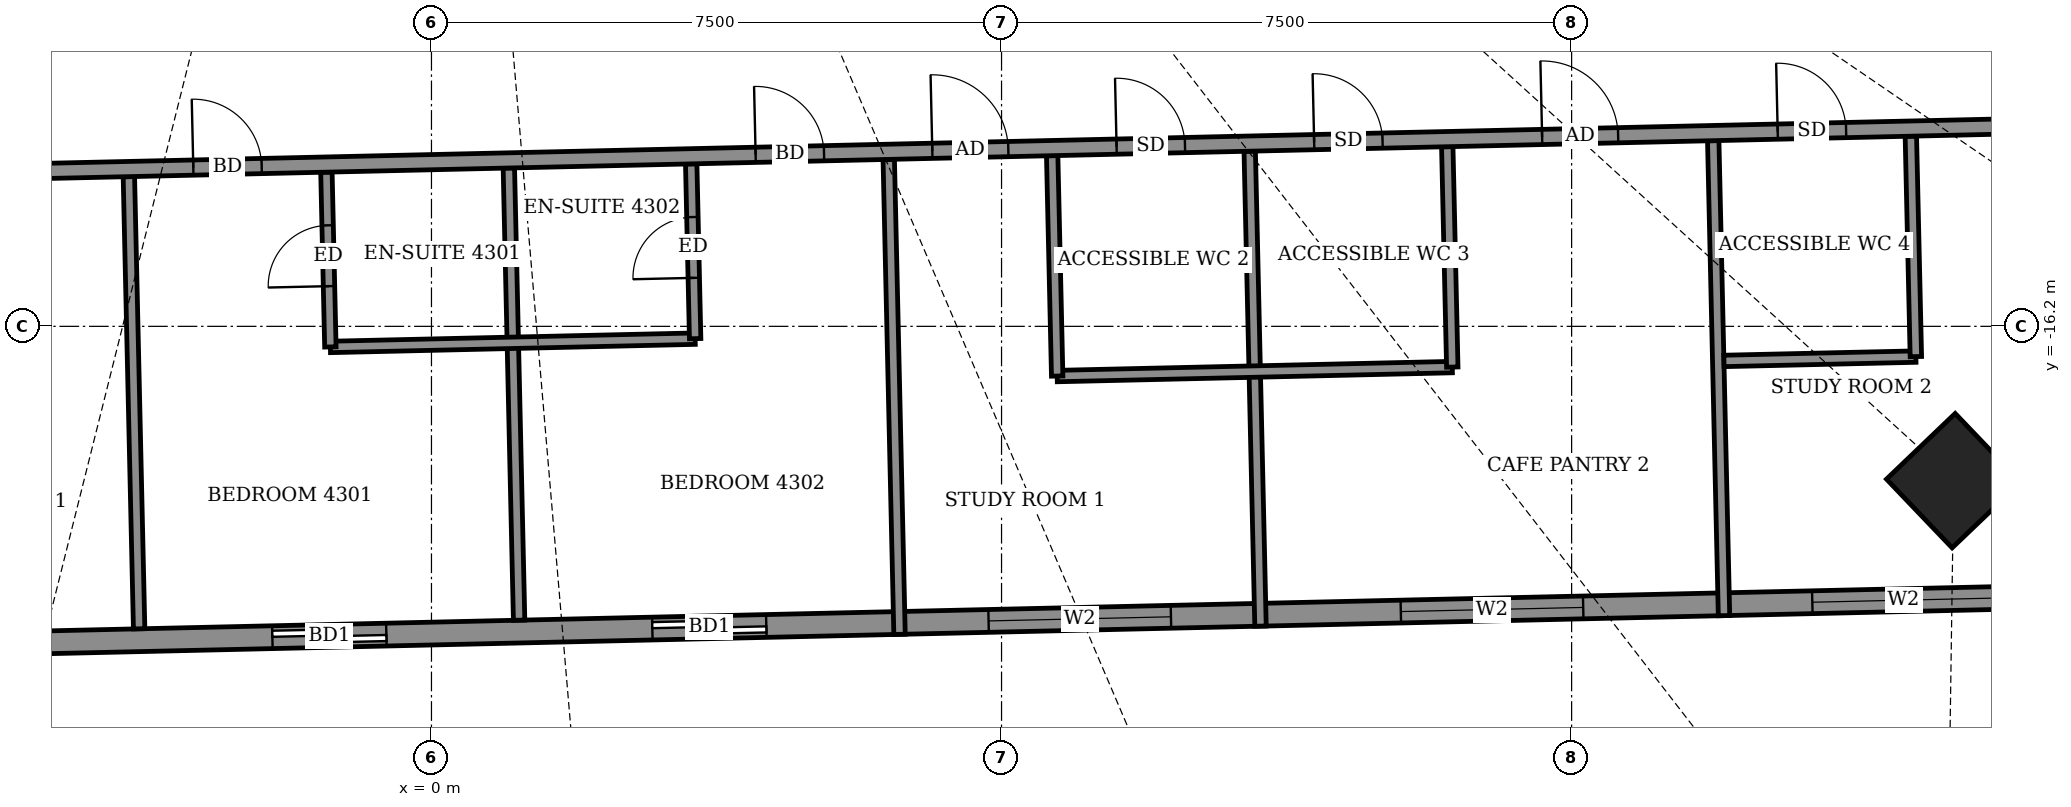
"""IFC4 building model, lengths in metres.
Left out: names, types, materials, properties, quantities, classifications, styles, units other than length and angle.
Written with IfcOpenShell. Run it as: python <this file> out.ifc"""

import sys

from ifc_helpers import new_model, si_unit, direction, frame, frame_2d, origin, origin_2d, place, context, subcontext, project, spatial, rectangle, extrude, element, fill, save


model = new_model("IFC4")
c1 = context("Model", 3, precision=1e-05, world=origin(), true_north=direction((0.0, 1.0)))
c2 = subcontext(c1, "Body", "Model", "MODEL_VIEW")
j1 = project(units=[si_unit("LENGTHUNIT", "METRE"), si_unit("PLANEANGLEUNIT", "RADIAN")], contexts=[c1])
p1 = place(None, origin())
s1 = spatial("IfcSite", under=j1, at=p1, CompositionType="ELEMENT")
p2 = place(p1, origin())
s2 = spatial("IfcBuilding", under=s1, at=p2, CompositionType="ELEMENT")
p3 = place(p2, frame((0.0, 0.0, 170.7)))
s3 = spatial("IfcBuildingStorey", under=s2, at=p3, CompositionType="ELEMENT", Elevation=170.7)
p4 = place(p3, frame((20.026, -18.23, -0.55), z_axis=(0.0, 0.0, 1.0), x_axis=(0.722965976266, 0.690883635037, 0.0)))
e1 = element("IfcColumn", 1, at=p4, inside=s3, PredefinedType="COLUMN", context=c2, shape_type="SweptSolid", body=[
    extrude(rectangle(XDim=1.25, YDim=1.25, at=origin_2d()), origin(), (0.0, 0.0, 1.0), 4.6),
])
p5 = place(p3, frame((-18.189, -20.655, 0.0), z_axis=(0.0, 0.0, 1.0), x_axis=(0.999742285265, 0.022701609063, 0.0)))
e2 = element("IfcWall", 2, at=p5, inside=s3, PredefinedType="SOLIDWALL", context=c2, shape_type="SweptSolid", body=[
    extrude(rectangle(XDim=39.78, YDim=0.3, at=frame_2d((19.89, 0.0))), origin(), (0.0, 0.0, 1.0), 2.55),
])
p6 = place(p5, frame((3.325, 0.0, 0.0)))
e3 = element("IfcOpeningElement", 3, at=p6, cuts=e2, PredefinedType="OPENING", context=c2, shape_type="SweptSolid", body=[
    extrude(rectangle(XDim=1.5, YDim=2.4, at=frame_2d((0.75, 1.2))), frame((0.0, 0.16, 0.0), z_axis=(0.0, -1.0, 0.0), x_axis=(1.0, 0.0, 0.0)), (0.0, 0.0, 1.0), 0.32),
])
p7 = place(p5, frame((10.125, 0.0, 0.9)))
e4 = element("IfcOpeningElement", 4, at=p7, cuts=e2, PredefinedType="OPENING", context=c2, shape_type="SweptSolid", body=[
    extrude(rectangle(XDim=2.4, YDim=1.5, at=frame_2d((1.2, 0.75))), frame((0.0, 0.16, 0.0), z_axis=(0.0, -1.0, 0.0), x_axis=(1.0, 0.0, 0.0)), (0.0, 0.0, 1.0), 0.32),
])
p8 = place(p5, frame((16.1, 0.0, 0.0)))
e5 = element("IfcOpeningElement", 5, at=p8, cuts=e2, PredefinedType="OPENING", context=c2, shape_type="SweptSolid", body=[
    extrude(rectangle(XDim=1.5, YDim=2.4, at=frame_2d((0.75, 1.2))), frame((0.0, 0.16, 0.0), z_axis=(0.0, -1.0, 0.0), x_axis=(1.0, 0.0, 0.0)), (0.0, 0.0, 1.0), 0.32),
])
p9 = place(p5, frame((21.1, 0.0, 0.0)))
e6 = element("IfcOpeningElement", 6, at=p9, cuts=e2, PredefinedType="OPENING", context=c2, shape_type="SweptSolid", body=[
    extrude(rectangle(XDim=1.5, YDim=2.4, at=frame_2d((0.75, 1.2))), frame((0.0, 0.16, 0.0), z_axis=(0.0, -1.0, 0.0), x_axis=(1.0, 0.0, 0.0)), (0.0, 0.0, 1.0), 0.32),
])
p10 = place(p5, frame((25.525, 0.0, 0.9)))
e7 = element("IfcOpeningElement", 7, at=p10, cuts=e2, PredefinedType="OPENING", context=c2, shape_type="SweptSolid", body=[
    extrude(rectangle(XDim=2.4, YDim=1.5, at=frame_2d((1.2, 0.75))), frame((0.0, 0.16, 0.0), z_axis=(0.0, -1.0, 0.0), x_axis=(1.0, 0.0, 0.0)), (0.0, 0.0, 1.0), 0.32),
])
p11 = place(p5, frame((30.95, 0.0, 0.9)))
e8 = element("IfcOpeningElement", 8, at=p11, cuts=e2, PredefinedType="OPENING", context=c2, shape_type="SweptSolid", body=[
    extrude(rectangle(XDim=2.4, YDim=1.5, at=frame_2d((1.2, 0.75))), frame((0.0, 0.16, 0.0), z_axis=(0.0, -1.0, 0.0), x_axis=(1.0, 0.0, 0.0)), (0.0, 0.0, 1.0), 0.32),
])
p12 = place(p5, frame((36.365, 0.0, 0.9)))
e9 = element("IfcOpeningElement", 9, at=p12, cuts=e2, PredefinedType="OPENING", context=c2, shape_type="SweptSolid", body=[
    extrude(rectangle(XDim=2.4, YDim=1.5, at=frame_2d((1.2, 0.75))), frame((0.0, 0.16, 0.0), z_axis=(0.0, -1.0, 0.0), x_axis=(1.0, 0.0, 0.0)), (0.0, 0.0, 1.0), 0.32),
])
p13 = place(p3, frame((-3.846, -20.179, 0.0), z_axis=(0.0, 0.0, 1.0), x_axis=(-0.022692509051, 0.999742491861, 0.0)))
e10 = element("IfcWall", 10, at=p13, inside=s3, PredefinedType="PARTITIONING", context=c2, shape_type="SweptSolid", body=[
    extrude(rectangle(XDim=5.949, YDim=0.15, at=frame_2d((2.975, 0.0))), origin(), (0.0, 0.0, 1.0), 2.85),
])
p14 = place(p3, frame((1.153, -20.066, 0.0), z_axis=(0.0, 0.0, 1.0), x_axis=(-0.022688785847, 0.999742576365, 0.0)))
e11 = element("IfcWall", 11, at=p14, inside=s3, PredefinedType="PARTITIONING", context=c2, shape_type="SweptSolid", body=[
    extrude(rectangle(XDim=5.95, YDim=0.15, at=frame_2d((2.975, 0.0))), origin(), (0.0, 0.0, 1.0), 2.85),
])
p15 = place(p3, frame((6.158, -20.252, 0.0), z_axis=(0.0, 0.0, 1.0), x_axis=(-0.022696558861, 0.999742399929, 0.0)))
e12 = element("IfcWall", 12, at=p15, inside=s3, PredefinedType="PARTITIONING", context=c2, shape_type="SweptSolid", body=[
    extrude(rectangle(XDim=6.25, YDim=0.15, at=frame_2d((3.125, 0.0))), origin(), (0.0, 0.0, 1.0), 2.85),
])
p16 = place(p3, frame((10.907, -20.144, 0.0), z_axis=(0.0, 0.0, 1.0), x_axis=(-0.02273560333, 0.999741512763, 0.0)))
e13 = element("IfcWall", 13, at=p16, inside=s3, PredefinedType="PARTITIONING", context=c2, shape_type="SweptSolid", body=[
    extrude(rectangle(XDim=6.25, YDim=0.15, at=frame_2d((3.125, 0.0))), origin(), (0.0, 0.0, 1.0), 2.55),
])
p17 = place(p3, frame((17.005, -20.006, 0.0), z_axis=(0.0, 0.0, 1.0), x_axis=(-0.022696558861, 0.999742399929, 0.0)))
e14 = element("IfcWall", 14, at=p17, inside=s3, PredefinedType="PARTITIONING", context=c2, shape_type="SweptSolid", body=[
    extrude(rectangle(XDim=6.25, YDim=0.15, at=frame_2d((3.125, 0.0))), origin(), (0.0, 0.0, 1.0), 2.85),
])
p18 = place(p3, frame((8.232, -16.854, 0.0), z_axis=(0.0, 0.0, 1.0), x_axis=(0.999742780105, 0.022679806622, 0.0)))
e15 = element("IfcWall", 15, at=p18, inside=s3, PredefinedType="PARTITIONING", context=c2, shape_type="SweptSolid", body=[
    extrude(rectangle(XDim=5.199, YDim=0.15, at=frame_2d((2.6, 0.0))), origin(), (0.0, 0.0, 1.0), 2.55),
])
p19 = place(p3, frame((8.232, -16.854, 0.0), z_axis=(0.0, 0.0, 1.0), x_axis=(-0.022732880677, 0.999741574676, 0.0)))
e16 = element("IfcWall", 16, at=p19, inside=s3, PredefinedType="PARTITIONING", context=c2, shape_type="SweptSolid", body=[
    extrude(rectangle(XDim=2.9, YDim=0.15, at=frame_2d((1.45, 0.0))), origin(), (0.0, 0.0, 1.0), 4.05),
])
p20 = place(p3, frame((13.43, -16.736, 0.0), z_axis=(0.0, 0.0, 1.0), x_axis=(-0.022730967319, 0.999741618182, 0.0)))
e17 = element("IfcWall", 17, at=p20, inside=s3, PredefinedType="PARTITIONING", context=c2, shape_type="SweptSolid", body=[
    extrude(rectangle(XDim=2.9, YDim=0.15, at=frame_2d((1.45, 0.0))), origin(), (0.0, 0.0, 1.0), 2.55),
])
p21 = place(p3, frame((17.004, -16.655, 0.0), z_axis=(0.0, 0.0, 1.0), x_axis=(0.999744175585, 0.022618209135, 0.0)))
e18 = element("IfcWall", 18, at=p21, inside=s3, PredefinedType="PARTITIONING", context=c2, shape_type="SweptSolid", body=[
    extrude(rectangle(XDim=2.526, YDim=0.15, at=frame_2d((1.263, 0.0))), origin(), (0.0, 0.0, 1.0), 2.85),
])
p22 = place(p3, frame((19.529, -16.598, 0.0), z_axis=(0.0, 0.0, 1.0), x_axis=(-0.022817032779, 0.999739657619, 0.0)))
e19 = element("IfcWall", 19, at=p22, inside=s3, PredefinedType="PARTITIONING", context=c2, shape_type="SweptSolid", body=[
    extrude(rectangle(XDim=2.9, YDim=0.15, at=frame_2d((1.45, 0.0))), origin(), (0.0, 0.0, 1.0), 2.75),
])
p23 = place(p3, frame((-1.33, -16.471, 0.0), z_axis=(0.0, 0.0, 1.0), x_axis=(0.999742701292, 0.022683280499, 0.0)))
e20 = element("IfcWall", 20, at=p23, inside=s3, PredefinedType="PARTITIONING", context=c2, shape_type="SweptSolid", body=[
    extrude(rectangle(XDim=4.8, YDim=0.15, at=frame_2d((2.4, 0.0))), origin(), (0.0, 0.0, 1.0), 2.85),
])
p24 = place(p3, frame((-1.33, -16.471, 0.0), z_axis=(0.0, 0.0, 1.0), x_axis=(-0.022615284993, 0.999744241736, 0.0)))
e21 = element("IfcWall", 21, at=p24, inside=s3, PredefinedType="PARTITIONING", context=c2, shape_type="SweptSolid", body=[
    extrude(rectangle(XDim=2.299, YDim=0.15, at=frame_2d((1.15, 0.0))), origin(), (0.0, 0.0, 1.0), 4.05),
])
p25 = place(p24, frame((0.8, 0.0, 0.0)))
e22 = element("IfcOpeningElement", 22, at=p25, cuts=e21, PredefinedType="OPENING", context=c2, shape_type="SweptSolid", body=[
    extrude(rectangle(XDim=0.8, YDim=2.1, at=frame_2d((0.4, 1.05))), frame((0.0, 0.085, 0.0), z_axis=(0.0, -1.0, 0.0), x_axis=(1.0, 0.0, 0.0)), (0.0, 0.0, 1.0), 0.17),
])
p26 = place(p3, frame((3.469, -16.362, 0.0), z_axis=(0.0, 0.0, 1.0), x_axis=(-0.022612884682, 0.999744296031, 0.0)))
e23 = element("IfcWall", 23, at=p26, inside=s3, PredefinedType="PARTITIONING", context=c2, shape_type="SweptSolid", body=[
    extrude(rectangle(XDim=2.3, YDim=0.15, at=frame_2d((1.15, 0.0))), origin(), (0.0, 0.0, 1.0), 4.05),
])
p27 = place(p26, frame((0.8, 0.0, 0.0)))
e24 = element("IfcOpeningElement", 24, at=p27, cuts=e23, PredefinedType="OPENING", context=c2, shape_type="SweptSolid", body=[
    extrude(rectangle(XDim=0.8, YDim=2.1, at=frame_2d((0.4, 1.05))), frame((0.0, 0.085, 0.0), z_axis=(0.0, -1.0, 0.0), x_axis=(1.0, 0.0, 0.0)), (0.0, 0.0, 1.0), 0.17),
])
p28 = place(p3, frame((-16.645, -14.418, 0.0), z_axis=(0.0, 0.0, 1.0), x_axis=(0.999742564802, 0.022689295346, 0.0)))
e25 = element("IfcWall", 25, at=p28, inside=s3, PredefinedType="PARTITIONING", context=c2, shape_type="SweptSolid", body=[
    extrude(rectangle(XDim=40.587, YDim=0.2, at=frame_2d((20.294, 0.0))), origin(), (0.0, 0.0, 1.0), 2.55),
])
p29 = place(p28, frame((4.965, 0.0, 0.0)))
e26 = element("IfcOpeningElement", 26, at=p29, cuts=e25, PredefinedType="OPENING", context=c2, shape_type="SweptSolid", body=[
    extrude(rectangle(XDim=0.9, YDim=2.1, at=frame_2d((0.45, 1.05))), frame((0.0, 0.11, 0.0), z_axis=(0.0, -1.0, 0.0), x_axis=(1.0, 0.0, 0.0)), (0.0, 0.0, 1.0), 0.22),
])
p30 = place(p28, frame((10.44, 0.0, 0.0)))
e27 = element("IfcOpeningElement", 27, at=p30, cuts=e25, PredefinedType="OPENING", context=c2, shape_type="SweptSolid", body=[
    extrude(rectangle(XDim=1.0, YDim=2.1, at=frame_2d((0.5, 1.05))), frame((0.0, 0.11, 0.0), z_axis=(0.0, -1.0, 0.0), x_axis=(1.0, 0.0, 0.0)), (0.0, 0.0, 1.0), 0.22),
])
p31 = place(p28, frame((7.465, 0.0, 0.0)))
e28 = element("IfcOpeningElement", 28, at=p31, cuts=e25, PredefinedType="OPENING", context=c2, shape_type="SweptSolid", body=[
    extrude(rectangle(XDim=0.9, YDim=2.1, at=frame_2d((0.45, 1.05))), frame((0.0, 0.11, 0.0), z_axis=(0.0, -1.0, 0.0), x_axis=(1.0, 0.0, 0.0)), (0.0, 0.0, 1.0), 0.22),
])
p32 = place(p28, frame((13.515, 0.0, 0.0)))
e29 = element("IfcOpeningElement", 29, at=p32, cuts=e25, PredefinedType="OPENING", context=c2, shape_type="SweptSolid", body=[
    extrude(rectangle(XDim=0.9, YDim=2.1, at=frame_2d((0.45, 1.05))), frame((0.0, 0.11, 0.0), z_axis=(0.0, -1.0, 0.0), x_axis=(1.0, 0.0, 0.0)), (0.0, 0.0, 1.0), 0.22),
])
p33 = place(p28, frame((20.915, 0.0, 0.0)))
e30 = element("IfcOpeningElement", 30, at=p33, cuts=e25, PredefinedType="OPENING", context=c2, shape_type="SweptSolid", body=[
    extrude(rectangle(XDim=0.9, YDim=2.1, at=frame_2d((0.45, 1.05))), frame((0.0, 0.11, 0.0), z_axis=(0.0, -1.0, 0.0), x_axis=(1.0, 0.0, 0.0)), (0.0, 0.0, 1.0), 0.22),
])
p34 = place(p28, frame((23.24, 0.0, 0.0)))
e31 = element("IfcOpeningElement", 31, at=p34, cuts=e25, PredefinedType="OPENING", context=c2, shape_type="SweptSolid", body=[
    extrude(rectangle(XDim=1.0, YDim=2.1, at=frame_2d((0.5, 1.05))), frame((0.0, 0.11, 0.0), z_axis=(0.0, -1.0, 0.0), x_axis=(1.0, 0.0, 0.0)), (0.0, 0.0, 1.0), 0.22),
])
p35 = place(p28, frame((25.665, 0.0, 0.0)))
e32 = element("IfcOpeningElement", 32, at=p35, cuts=e25, PredefinedType="OPENING", context=c2, shape_type="SweptSolid", body=[
    extrude(rectangle(XDim=0.9, YDim=2.1, at=frame_2d((0.45, 1.05))), frame((0.0, 0.11, 0.0), z_axis=(0.0, -1.0, 0.0), x_axis=(1.0, 0.0, 0.0)), (0.0, 0.0, 1.0), 0.22),
])
p36 = place(p28, frame((31.265, 0.0, 0.0)))
e33 = element("IfcOpeningElement", 33, at=p36, cuts=e25, PredefinedType="OPENING", context=c2, shape_type="SweptSolid", body=[
    extrude(rectangle(XDim=1.0, YDim=2.1, at=frame_2d((0.5, 1.05))), frame((0.0, 0.11, 0.0), z_axis=(0.0, -1.0, 0.0), x_axis=(1.0, 0.0, 0.0)), (0.0, 0.0, 1.0), 0.22),
])
p37 = place(p28, frame((28.265, 0.0, 0.0)))
e34 = element("IfcOpeningElement", 34, at=p37, cuts=e25, PredefinedType="OPENING", context=c2, shape_type="SweptSolid", body=[
    extrude(rectangle(XDim=0.9, YDim=2.1, at=frame_2d((0.45, 1.05))), frame((0.0, 0.11, 0.0), z_axis=(0.0, -1.0, 0.0), x_axis=(1.0, 0.0, 0.0)), (0.0, 0.0, 1.0), 0.22),
])
p38 = place(p28, frame((39.18, 0.0, 0.0)))
e35 = element("IfcOpeningElement", 35, at=p38, cuts=e25, PredefinedType="OPENING", context=c2, shape_type="SweptSolid", body=[
    extrude(rectangle(XDim=1.0, YDim=2.1, at=frame_2d((0.5, 1.05))), frame((0.0, 0.11, 0.0), z_axis=(0.0, -1.0, 0.0), x_axis=(1.0, 0.0, 0.0)), (0.0, 0.0, 1.0), 0.22),
])
p39 = place(p28, frame((34.365, 0.0, 0.0)))
e36 = element("IfcOpeningElement", 36, at=p39, cuts=e25, PredefinedType="OPENING", context=c2, shape_type="SweptSolid", body=[
    extrude(rectangle(XDim=0.9, YDim=2.1, at=frame_2d((0.45, 1.05))), frame((0.0, 0.11, 0.0), z_axis=(0.0, -1.0, 0.0), x_axis=(1.0, 0.0, 0.0)), (0.0, 0.0, 1.0), 0.22),
])
p40 = place(p8, origin())
e37 = element("IfcDoor", 37, at=p40, inside=s3, OperationType="SLIDING_TO_LEFT", PredefinedType="DOOR", context=c2, shape_type="SweptSolid", body=[
    extrude(rectangle(XDim=1.5, YDim=2.4, at=frame_2d((0.75, 1.2))), frame((0.0, 0.025, 0.0), z_axis=(0.0, -1.0, 0.0), x_axis=(1.0, 0.0, 0.0)), (0.0, 0.0, 1.0), 0.05),
])
fill(e5, e37)
p41 = place(p9, origin())
e38 = element("IfcDoor", 38, at=p41, inside=s3, OperationType="SLIDING_TO_LEFT", PredefinedType="DOOR", context=c2, shape_type="SweptSolid", body=[
    extrude(rectangle(XDim=1.5, YDim=2.4, at=frame_2d((0.75, 1.2))), frame((0.0, 0.025, 0.0), z_axis=(0.0, -1.0, 0.0), x_axis=(1.0, 0.0, 0.0)), (0.0, 0.0, 1.0), 0.05),
])
fill(e6, e38)
p42 = place(p10, origin())
e39 = element("IfcWindow", 39, at=p42, inside=s3, PartitioningType="DOUBLE_PANEL_VERTICAL", PredefinedType="WINDOW", context=c2, shape_type="SweptSolid", body=[
    extrude(rectangle(XDim=2.4, YDim=1.5, at=frame_2d((1.2, 0.75))), frame((0.0, 0.03, 0.0), z_axis=(0.0, -1.0, 0.0), x_axis=(1.0, 0.0, 0.0)), (0.0, 0.0, 1.0), 0.06),
])
fill(e7, e39)
p43 = place(p11, origin())
e40 = element("IfcWindow", 40, at=p43, inside=s3, PartitioningType="DOUBLE_PANEL_VERTICAL", PredefinedType="WINDOW", context=c2, shape_type="SweptSolid", body=[
    extrude(rectangle(XDim=2.4, YDim=1.5, at=frame_2d((1.2, 0.75))), frame((0.0, 0.03, 0.0), z_axis=(0.0, -1.0, 0.0), x_axis=(1.0, 0.0, 0.0)), (0.0, 0.0, 1.0), 0.06),
])
fill(e8, e40)
p44 = place(p12, origin())
e41 = element("IfcWindow", 41, at=p44, inside=s3, PartitioningType="DOUBLE_PANEL_VERTICAL", PredefinedType="WINDOW", context=c2, shape_type="SweptSolid", body=[
    extrude(rectangle(XDim=2.4, YDim=1.5, at=frame_2d((1.2, 0.75))), frame((0.0, 0.03, 0.0), z_axis=(0.0, -1.0, 0.0), x_axis=(1.0, 0.0, 0.0)), (0.0, 0.0, 1.0), 0.06),
])
fill(e9, e41)
p45 = place(p32, origin())
e42 = element("IfcDoor", 42, at=p45, inside=s3, OperationType="SINGLE_SWING_LEFT", PredefinedType="DOOR", context=c2, shape_type="SweptSolid", body=[
    extrude(rectangle(XDim=0.9, YDim=2.1, at=frame_2d((0.45, 1.05))), frame((0.0, 0.025, 0.0), z_axis=(0.0, -1.0, 0.0), x_axis=(1.0, 0.0, 0.0)), (0.0, 0.0, 1.0), 0.05),
])
fill(e29, e42)
p46 = place(p25, origin())
e43 = element("IfcDoor", 43, at=p46, inside=s3, OperationType="SINGLE_SWING_LEFT", PredefinedType="DOOR", context=c2, shape_type="SweptSolid", body=[
    extrude(rectangle(XDim=0.8, YDim=2.1, at=frame_2d((0.4, 1.05))), frame((0.0, 0.025, 0.0), z_axis=(0.0, -1.0, 0.0), x_axis=(1.0, 0.0, 0.0)), (0.0, 0.0, 1.0), 0.05),
])
fill(e22, e43)
p47 = place(p33, origin())
e44 = element("IfcDoor", 44, at=p47, inside=s3, OperationType="SINGLE_SWING_RIGHT", PredefinedType="DOOR", context=c2, shape_type="SweptSolid", body=[
    extrude(rectangle(XDim=0.9, YDim=2.1, at=frame_2d((0.45, 1.05))), frame((0.0, 0.025, 0.0), z_axis=(0.0, -1.0, 0.0), x_axis=(1.0, 0.0, 0.0)), (0.0, 0.0, 1.0), 0.05),
])
fill(e30, e44)
p48 = place(p27, origin())
e45 = element("IfcDoor", 45, at=p48, inside=s3, OperationType="SINGLE_SWING_RIGHT", PredefinedType="DOOR", context=c2, shape_type="SweptSolid", body=[
    extrude(rectangle(XDim=0.8, YDim=2.1, at=frame_2d((0.4, 1.05))), frame((0.0, 0.025, 0.0), z_axis=(0.0, -1.0, 0.0), x_axis=(1.0, 0.0, 0.0)), (0.0, 0.0, 1.0), 0.05),
])
fill(e24, e45)
p49 = place(p34, origin())
e46 = element("IfcDoor", 46, at=p49, inside=s3, OperationType="SINGLE_SWING_LEFT", PredefinedType="DOOR", context=c2, shape_type="SweptSolid", body=[
    extrude(rectangle(XDim=1.0, YDim=2.1, at=frame_2d((0.5, 1.05))), frame((0.0, 0.025, 0.0), z_axis=(0.0, -1.0, 0.0), x_axis=(1.0, 0.0, 0.0)), (0.0, 0.0, 1.0), 0.05),
])
fill(e31, e46)
p50 = place(p35, origin())
e47 = element("IfcDoor", 47, at=p50, inside=s3, OperationType="SINGLE_SWING_LEFT", PredefinedType="DOOR", context=c2, shape_type="SweptSolid", body=[
    extrude(rectangle(XDim=0.9, YDim=2.1, at=frame_2d((0.45, 1.05))), frame((0.0, 0.025, 0.0), z_axis=(0.0, -1.0, 0.0), x_axis=(1.0, 0.0, 0.0)), (0.0, 0.0, 1.0), 0.05),
])
fill(e32, e47)
p51 = place(p36, origin())
e48 = element("IfcDoor", 48, at=p51, inside=s3, OperationType="SINGLE_SWING_RIGHT", PredefinedType="DOOR", context=c2, shape_type="SweptSolid", body=[
    extrude(rectangle(XDim=1.0, YDim=2.1, at=frame_2d((0.5, 1.05))), frame((0.0, 0.025, 0.0), z_axis=(0.0, -1.0, 0.0), x_axis=(1.0, 0.0, 0.0)), (0.0, 0.0, 1.0), 0.05),
])
fill(e33, e48)
p52 = place(p37, origin())
e49 = element("IfcDoor", 49, at=p52, inside=s3, OperationType="SINGLE_SWING_RIGHT", PredefinedType="DOOR", context=c2, shape_type="SweptSolid", body=[
    extrude(rectangle(XDim=0.9, YDim=2.1, at=frame_2d((0.45, 1.05))), frame((0.0, 0.025, 0.0), z_axis=(0.0, -1.0, 0.0), x_axis=(1.0, 0.0, 0.0)), (0.0, 0.0, 1.0), 0.05),
])
fill(e34, e49)
p53 = place(p39, origin())
e50 = element("IfcDoor", 50, at=p53, inside=s3, OperationType="SINGLE_SWING_LEFT", PredefinedType="DOOR", context=c2, shape_type="SweptSolid", body=[
    extrude(rectangle(XDim=0.9, YDim=2.1, at=frame_2d((0.45, 1.05))), frame((0.0, 0.025, 0.0), z_axis=(0.0, -1.0, 0.0), x_axis=(1.0, 0.0, 0.0)), (0.0, 0.0, 1.0), 0.05),
])
fill(e36, e50)
save(model, sys.argv[1])
